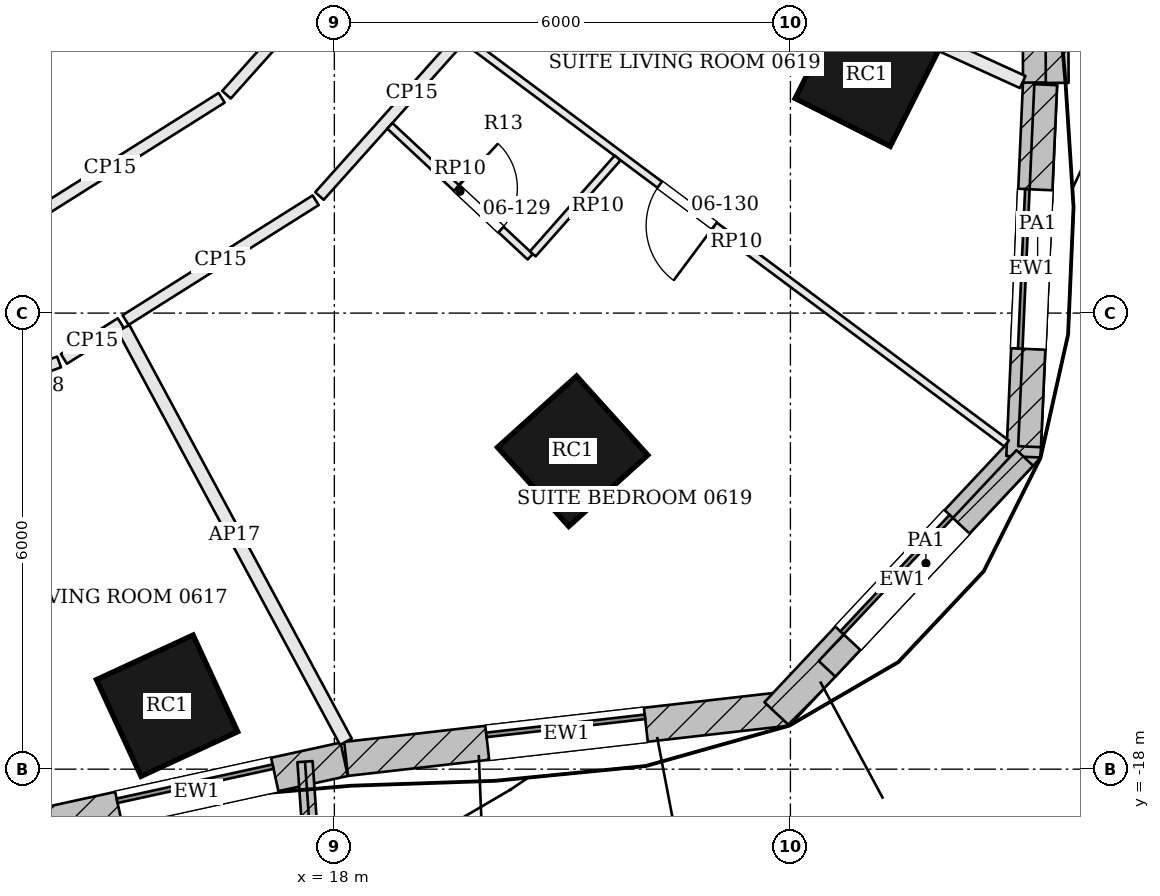
"""IFC4 building model, lengths in metres.
Left out: names, types, materials, properties, quantities, classifications, styles, units other than length and angle.
Written with IfcOpenShell. Run it as: python <this file> out.ifc"""

import sys

from ifc_helpers import new_model, si_unit, direction, frame, frame_2d, origin, origin_2d, place, context, subcontext, project, spatial, rectangle, extrude, element, fill, save


model = new_model("IFC4")
c1 = context("Model", 3, precision=1e-05, world=origin(), true_north=direction((0.0, 1.0)))
c2 = subcontext(c1, "Body", "Model", "MODEL_VIEW")
j1 = project(units=[si_unit("LENGTHUNIT", "METRE"), si_unit("PLANEANGLEUNIT", "RADIAN")], contexts=[c1])
p1 = place(None, origin())
s1 = spatial("IfcSite", under=j1, at=p1, CompositionType="ELEMENT")
p2 = place(p1, origin())
s2 = spatial("IfcBuilding", under=s1, at=p2, CompositionType="ELEMENT")
p3 = place(p2, frame((0.0, 0.0, 37.5)))
s3 = spatial("IfcBuildingStorey", under=s2, at=p3, CompositionType="ELEMENT", Elevation=37.5)
for number, where, z_axis, x_axis in (
    (1, (15.799, -17.165, 0.0), (0.0, 0.0, 1.0), (0.908, 0.419, 0.0)),
    (2, (21.135, -13.817, 0.0), (0.0, 0.0, 1.0), (0.743, 0.67, 0.0)),
    (3, (25.003, -8.866, 0.0), (0.0, 0.0, 1.0), (0.45, 0.893, 0.0)),
):
    element("IfcColumn", number, at=place(p3, frame(where, z_axis=z_axis, x_axis=x_axis)), inside=s3, PredefinedType="COLUMN", context=c2, shape_type="SweptSolid", body=[
        extrude(rectangle(XDim=1.4, YDim=1.4, at=origin_2d()), origin(), (0.0, 0.0, 1.0), 3.6),
    ])
p4 = place(p3, frame((10.879, -21.473, 0.0), z_axis=(0.0, 0.0, 1.0), x_axis=(0.77124668946, 0.636536365023, 0.0)))
e4 = element("IfcWall", 4, at=p4, inside=s3, PredefinedType="SOLIDWALL", context=c2, shape_type="SweptSolid", body=[
    extrude(rectangle(XDim=4.261, YDim=0.45, at=frame_2d((2.13, 0.0))), origin(), (0.0, 0.0, 1.0), 3.4),
])
p5 = place(p4, frame((1.08, 0.0, 0.9)))
e5 = element("IfcOpeningElement", 5, at=p5, cuts=e4, PredefinedType="OPENING", context=c2, shape_type="SweptSolid", body=[
    extrude(rectangle(XDim=2.1, YDim=2.0, at=frame_2d((1.05, 1.0))), frame((0.0, 0.235, 0.0), z_axis=(0.0, -1.0, 0.0), x_axis=(1.0, 0.0, 0.0)), (0.0, 0.0, 1.0), 0.47),
])
p6 = place(p3, frame((14.251, -18.718, 0.0), z_axis=(0.0, 0.0, 1.0), x_axis=(0.976903627618, 0.213680374267, 0.0)))
e6 = element("IfcWall", 6, at=p6, inside=s3, PredefinedType="SOLIDWALL", context=c2, shape_type="SweptSolid", body=[
    extrude(rectangle(XDim=3.97, YDim=0.45, at=frame_2d((1.985, 0.0))), origin(), (0.0, 0.0, 1.0), 3.4),
])
p7 = place(p6, frame((0.935, 0.0, 0.9)))
e7 = element("IfcOpeningElement", 7, at=p7, cuts=e6, PredefinedType="OPENING", context=c2, shape_type="SweptSolid", body=[
    extrude(rectangle(XDim=2.1, YDim=2.0, at=frame_2d((1.05, 1.0))), frame((0.0, 0.235, 0.0), z_axis=(0.0, -1.0, 0.0), x_axis=(1.0, 0.0, 0.0)), (0.0, 0.0, 1.0), 0.47),
])
p8 = place(p3, frame((18.154, -17.865, 0.0), z_axis=(0.0, 0.0, 1.0), x_axis=(0.993572909097, 0.113193967633, 0.0)))
e8 = element("IfcWall", 8, at=p8, inside=s3, PredefinedType="SOLIDWALL", context=c2, shape_type="SweptSolid", body=[
    extrude(rectangle(XDim=5.839, YDim=0.45, at=frame_2d((2.919, 0.0))), origin(), (0.0, 0.0, 1.0), 3.4),
])
p9 = place(p8, frame((1.869, 0.0, 0.9)))
e9 = element("IfcOpeningElement", 9, at=p9, cuts=e8, PredefinedType="OPENING", context=c2, shape_type="SweptSolid", body=[
    extrude(rectangle(XDim=2.1, YDim=2.0, at=frame_2d((1.05, 1.0))), frame((0.0, 0.235, 0.0), z_axis=(0.0, -1.0, 0.0), x_axis=(1.0, 0.0, 0.0)), (0.0, 0.0, 1.0), 0.47),
])
p10 = place(p3, frame((23.822, -17.273, 0.0), z_axis=(0.0, 0.0, 1.0), x_axis=(0.684173167988, 0.729319598122, 0.0)))
e10 = element("IfcWall", 10, at=p10, inside=s3, PredefinedType="SOLIDWALL", context=c2, shape_type="SweptSolid", body=[
    extrude(rectangle(XDim=4.829, YDim=0.45, at=frame_2d((2.415, 0.0))), origin(), (0.0, 0.0, 1.0), 3.4),
])
p11 = place(p10, frame((1.365, 0.0, 0.9)))
e11 = element("IfcOpeningElement", 11, at=p11, cuts=e10, PredefinedType="OPENING", context=c2, shape_type="SweptSolid", body=[
    extrude(rectangle(XDim=2.1, YDim=2.0, at=frame_2d((1.05, 1.0))), frame((0.0, 0.235, 0.0), z_axis=(0.0, -1.0, 0.0), x_axis=(1.0, 0.0, 0.0)), (0.0, 0.0, 1.0), 0.47),
])
p12 = place(p3, frame((27.065, -13.89, 0.0), z_axis=(0.0, 0.0, 1.0), x_axis=(0.044544250924, 0.99900741224, 0.0)))
e12 = element("IfcWall", 12, at=p12, inside=s3, PredefinedType="SOLIDWALL", context=c2, shape_type="SweptSolid", body=[
    extrude(rectangle(XDim=4.938, YDim=0.45, at=frame_2d((2.469, 0.0))), origin(), (0.0, 0.0, 1.0), 3.4),
])
p13 = place(p12, frame((1.419, 0.0, 0.9)))
e13 = element("IfcOpeningElement", 13, at=p13, cuts=e12, PredefinedType="OPENING", context=c2, shape_type="SweptSolid", body=[
    extrude(rectangle(XDim=2.1, YDim=2.0, at=frame_2d((1.05, 1.0))), frame((0.0, 0.235, 0.0), z_axis=(0.0, -1.0, 0.0), x_axis=(1.0, 0.0, 0.0)), (0.0, 0.0, 1.0), 0.47),
])
p14 = place(p3, frame((27.285, -8.967, 0.0), z_axis=(0.0, 0.0, 1.0), x_axis=(-0.003185571797, 0.999994926053, 0.0)))
e14 = element("IfcWall", 14, at=p14, inside=s3, PredefinedType="SOLIDWALL", context=c2, shape_type="SweptSolid", body=[
    extrude(rectangle(XDim=4.445, YDim=0.45, at=frame_2d((2.223, 0.0))), origin(), (0.0, 0.0, 1.0), 3.4),
])
p15 = place(p14, frame((1.173, 0.0, 0.9)))
e15 = element("IfcOpeningElement", 15, at=p15, cuts=e14, PredefinedType="OPENING", context=c2, shape_type="SweptSolid", body=[
    extrude(rectangle(XDim=2.1, YDim=2.0, at=frame_2d((1.05, 1.0))), frame((0.0, 0.235, 0.0), z_axis=(0.0, -1.0, 0.0), x_axis=(1.0, 0.0, 0.0)), (0.0, 0.0, 1.0), 0.47),
])
p16 = place(p3, frame((17.614, -17.901, 0.0), z_axis=(0.0, 0.0, 1.0), x_axis=(0.069750000204, -0.997564502913, 0.0)))
e16 = element("IfcWall", 16, at=p16, inside=s3, PredefinedType="SOLIDWALL", context=c2, shape_type="SweptSolid", body=[
    extrude(rectangle(XDim=1.75, YDim=0.2, at=frame_2d((0.875, 0.0))), origin(), (0.0, 0.0, 1.0), 3.4),
])
p17 = place(p3, frame((24.481, -16.68, 3.6), z_axis=(0.0, 0.0, 1.0), x_axis=(0.684154586848, 0.729337028606, 0.0)))
e17 = element("IfcWall", 17, at=p17, inside=s3, PredefinedType="PARAPET", context=c2, shape_type="SweptSolid", body=[
    extrude(rectangle(XDim=3.804, YDim=0.3, at=frame_2d((1.902, 0.0))), origin(), (0.0, 0.0, 1.0), 1.1),
])
p18 = place(p3, frame((27.146, -13.757, 3.6), z_axis=(0.0, 0.0, 1.0), x_axis=(0.044503972994, 0.999009207359, 0.0)))
e18 = element("IfcWall", 18, at=p18, inside=s3, PredefinedType="PARAPET", context=c2, shape_type="SweptSolid", body=[
    extrude(rectangle(XDim=4.767, YDim=0.3, at=frame_2d((2.384, 0.0))), origin(), (0.0, 0.0, 1.0), 1.1),
])
p19 = place(p3, frame((27.51, -8.972, 3.6), z_axis=(0.0, 0.0, 1.0), x_axis=(-0.003223981002, 0.99999480296, 0.0)))
e19 = element("IfcWall", 19, at=p19, inside=s3, PredefinedType="PARAPET", context=c2, shape_type="SweptSolid", body=[
    extrude(rectangle(XDim=1.742, YDim=0.3, at=frame_2d((0.871, 0.0))), origin(), (0.0, 0.0, 1.0), 1.1),
])
p20 = place(p3, frame((10.543, -14.04, 0.0), z_axis=(0.0, 0.0, 1.0), x_axis=(0.939576705301, 0.342338450741, 0.0)))
e20 = element("IfcWall", 20, at=p20, inside=s3, PredefinedType="PARTITIONING", context=c2, shape_type="SweptSolid", body=[
    extrude(rectangle(XDim=4.082, YDim=0.15, at=frame_2d((2.041, 0.0))), origin(), (0.0, 0.0, 1.0), 2.68),
])
p21 = place(p20, frame((2.65, 0.0, 0.0)))
e21 = element("IfcOpeningElement", 21, at=p21, cuts=e20, PredefinedType="OPENING", context=c2, shape_type="SweptSolid", body=[
    extrude(rectangle(XDim=1.0, YDim=2.1, at=frame_2d((0.5, 1.05))), frame((0.0, 0.085, 0.0), z_axis=(0.0, -1.0, 0.0), x_axis=(1.0, 0.0, 0.0)), (0.0, 0.0, 1.0), 0.17),
])
p22 = place(p3, frame((14.442, -12.603, 0.0), z_axis=(0.0, 0.0, 1.0), x_axis=(0.845928311112, 0.533296627084, 0.0)))
e22 = element("IfcWall", 22, at=p22, inside=s3, PredefinedType="PARTITIONING", context=c2, shape_type="SweptSolid", body=[
    extrude(rectangle(XDim=0.884, YDim=0.15, at=frame_2d((0.442, 0.0))), origin(), (0.0, 0.0, 1.0), 2.68),
])
p23 = place(p3, frame((18.152, -17.639, 0.0), z_axis=(0.0, 0.0, 1.0), x_axis=(-0.47366383337, 0.880705724381, 0.0)))
e23 = element("IfcWall", 23, at=p23, inside=s3, PredefinedType="PARTITIONING", context=c2, shape_type="SweptSolid", body=[
    extrude(rectangle(XDim=6.178, YDim=0.175, at=frame_2d((3.089, 0.0))), origin(), (0.0, 0.0, 1.0), 2.68),
])
p24 = place(p3, frame((15.253, -12.091, 0.0), z_axis=(0.0, 0.0, 1.0), x_axis=(0.846020362576, 0.533150584832, 0.0)))
e24 = element("IfcWall", 24, at=p24, inside=s3, PredefinedType="PARTITIONING", context=c2, shape_type="SweptSolid", body=[
    extrude(rectangle(XDim=2.956, YDim=0.15, at=frame_2d((1.478, 0.0))), origin(), (0.0, 0.0, 1.0), 2.68),
])
p25 = place(p3, frame((17.804, -10.46, 0.0), z_axis=(0.0, 0.0, 1.0), x_axis=(0.666597463623, 0.745417883802, 0.0)))
e25 = element("IfcWall", 25, at=p25, inside=s3, PredefinedType="PARTITIONING", context=c2, shape_type="SweptSolid", body=[
    extrude(rectangle(XDim=3.652, YDim=0.15, at=frame_2d((1.826, 0.0))), origin(), (0.0, 0.0, 1.0), 2.68),
])
p26 = place(p3, frame((27.056, -8.96, 0.0), z_axis=(0.0, 0.0, 1.0), x_axis=(-0.910155137501, 0.414267577396, 0.0)))
e26 = element("IfcWall", 26, at=p26, inside=s3, PredefinedType="PARTITIONING", context=c2, shape_type="SweptSolid", body=[
    extrude(rectangle(XDim=6.611, YDim=0.175, at=frame_2d((3.305, 0.0))), origin(), (0.0, 0.0, 1.0), 2.68),
])
p27 = place(p3, frame((18.673, -6.788, 0.0), z_axis=(0.0, 0.0, 1.0), x_axis=(-0.666610670036, -0.745406073623, 0.0)))
e27 = element("IfcWall", 27, at=p27, inside=s3, PredefinedType="PARTITIONING", context=c2, shape_type="SweptSolid", body=[
    extrude(rectangle(XDim=3.139, YDim=0.15, at=frame_2d((1.569, 0.0))), origin(), (0.0, 0.0, 1.0), 2.68),
])
p28 = place(p3, frame((16.517, -9.167, 0.0), z_axis=(0.0, 0.0, 1.0), x_axis=(-0.846000117603, -0.533182708849, 0.0)))
e28 = element("IfcWall", 28, at=p28, inside=s3, PredefinedType="PARTITIONING", context=c2, shape_type="SweptSolid", body=[
    extrude(rectangle(XDim=3.47, YDim=0.15, at=frame_2d((1.735, 0.0))), origin(), (0.0, 0.0, 1.0), 2.68),
])
p29 = place(p3, frame((26.844, -13.716, 0.0), z_axis=(0.0, 0.0, 1.0), x_axis=(-0.801513651747, 0.597976476179, 0.0)))
e29 = element("IfcWall", 29, at=p29, inside=s3, PredefinedType="PARTITIONING", context=c2, shape_type="SweptSolid", body=[
    extrude(rectangle(XDim=8.869, YDim=0.1, at=frame_2d((4.435, 0.0))), origin(), (0.0, 0.0, 1.0), 2.884),
])
p30 = place(p29, frame((4.794, 0.0, 0.0)))
e30 = element("IfcOpeningElement", 30, at=p30, cuts=e29, PredefinedType="OPENING", context=c2, shape_type="SweptSolid", body=[
    extrude(rectangle(XDim=0.9, YDim=2.4, at=frame_2d((0.45, 1.2))), frame((0.0, 0.06, 0.0), z_axis=(0.0, -1.0, 0.0), x_axis=(1.0, 0.0, 0.0)), (0.0, 0.0, 1.0), 0.12),
])
p31 = place(p3, frame((18.73, -9.537, 0.0), z_axis=(0.0, 0.0, 1.0), x_axis=(0.731379942675, -0.68197021889, 0.0)))
e31 = element("IfcWall", 31, at=p31, inside=s3, PredefinedType="PARTITIONING", context=c2, shape_type="SweptSolid", body=[
    extrude(rectangle(XDim=2.525, YDim=0.1, at=frame_2d((1.262, 0.0))), origin(), (0.0, 0.0, 1.0), 2.884),
])
p32 = place(p31, frame((1.2, 0.0, 0.0)))
e32 = element("IfcOpeningElement", 32, at=p32, cuts=e31, PredefinedType="OPENING", context=c2, shape_type="SweptSolid", body=[
    extrude(rectangle(XDim=0.8, YDim=2.1, at=frame_2d((0.4, 1.05))), frame((0.0, 0.06, 0.0), z_axis=(0.0, -1.0, 0.0), x_axis=(1.0, 0.0, 0.0)), (0.0, 0.0, 1.0), 0.12),
])
p33 = place(p3, frame((20.61, -11.221, 0.0), z_axis=(0.0, 0.0, 1.0), x_axis=(0.66251758855, 0.749046356951, 0.0)))
e33 = element("IfcWall", 33, at=p33, inside=s3, PredefinedType="PARTITIONING", context=c2, shape_type="SweptSolid", body=[
    extrude(rectangle(XDim=1.684, YDim=0.1, at=frame_2d((0.842, 0.0))), origin(), (0.0, 0.0, 1.0), 2.884),
])
p34 = place(p7, origin())
e34 = element("IfcWindow", 34, at=p34, inside=s3, PartitioningType="SINGLE_PANEL", PredefinedType="WINDOW", context=c2, shape_type="SweptSolid", body=[
    extrude(rectangle(XDim=2.1, YDim=2.0, at=frame_2d((1.05, 1.0))), frame((0.0, 0.135, 0.0), z_axis=(0.0, -1.0, 0.0), x_axis=(1.0, 0.0, 0.0)), (0.0, 0.0, 1.0), 0.06),
])
fill(e7, e34)
p35 = place(p9, origin())
e35 = element("IfcWindow", 35, at=p35, inside=s3, PartitioningType="SINGLE_PANEL", PredefinedType="WINDOW", context=c2, shape_type="SweptSolid", body=[
    extrude(rectangle(XDim=2.1, YDim=2.0, at=frame_2d((1.05, 1.0))), frame((0.0, 0.135, 0.0), z_axis=(0.0, -1.0, 0.0), x_axis=(1.0, 0.0, 0.0)), (0.0, 0.0, 1.0), 0.06),
])
fill(e9, e35)
p36 = place(p11, origin())
e36 = element("IfcWindow", 36, at=p36, inside=s3, PartitioningType="SINGLE_PANEL", PredefinedType="WINDOW", context=c2, shape_type="SweptSolid", body=[
    extrude(rectangle(XDim=2.1, YDim=2.0, at=frame_2d((1.05, 1.0))), frame((0.0, 0.135, 0.0), z_axis=(0.0, -1.0, 0.0), x_axis=(1.0, 0.0, 0.0)), (0.0, 0.0, 1.0), 0.06),
])
fill(e11, e36)
p37 = place(p13, origin())
e37 = element("IfcWindow", 37, at=p37, inside=s3, PartitioningType="SINGLE_PANEL", PredefinedType="WINDOW", context=c2, shape_type="SweptSolid", body=[
    extrude(rectangle(XDim=2.1, YDim=2.0, at=frame_2d((1.05, 1.0))), frame((0.0, 0.135, 0.0), z_axis=(0.0, -1.0, 0.0), x_axis=(1.0, 0.0, 0.0)), (0.0, 0.0, 1.0), 0.06),
])
fill(e13, e37)
p38 = place(p32, origin())
e38 = element("IfcDoor", 38, at=p38, inside=s3, OperationType="SINGLE_SWING_LEFT", PredefinedType="DOOR", context=c2, shape_type="SweptSolid", body=[
    extrude(rectangle(XDim=0.8, YDim=2.1, at=frame_2d((0.4, 1.05))), frame((0.0, 0.025, 0.0), z_axis=(0.0, -1.0, 0.0), x_axis=(1.0, 0.0, 0.0)), (0.0, 0.0, 1.0), 0.05),
])
fill(e32, e38)
p39 = place(p30, origin())
e39 = element("IfcDoor", 39, at=p39, inside=s3, OperationType="SINGLE_SWING_LEFT", PredefinedType="DOOR", context=c2, shape_type="SweptSolid", body=[
    extrude(rectangle(XDim=0.9, YDim=2.4, at=frame_2d((0.45, 1.2))), frame((0.0, 0.025, 0.0), z_axis=(0.0, -1.0, 0.0), x_axis=(1.0, 0.0, 0.0)), (0.0, 0.0, 1.0), 0.05),
])
fill(e30, e39)
save(model, sys.argv[1])
